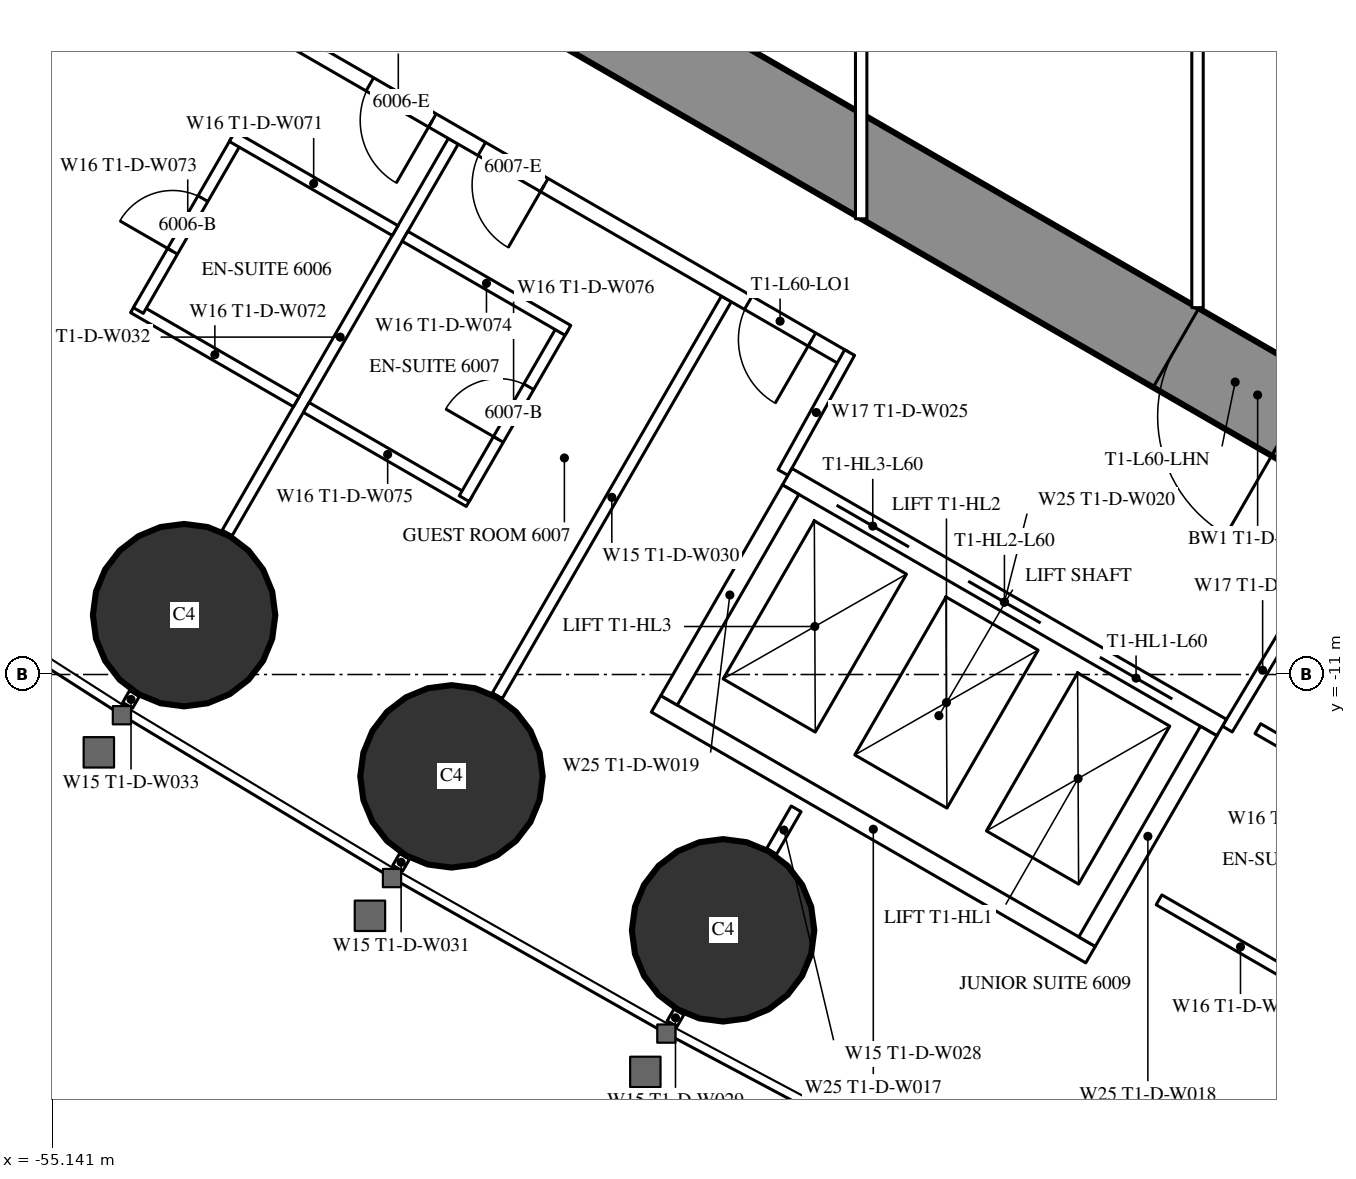
"""IFC4 building model, lengths in metres.
Left out: names, types, materials, properties, quantities, classifications, styles, units other than length and angle.
Written with IfcOpenShell. Run it as: python <this file> out.ifc"""

import sys

from ifc_helpers import new_model, si_unit, direction, frame, frame_2d, origin, origin_2d, place, context, subcontext, project, spatial, rectangle, circle, extrude, element, fill, save


model = new_model("IFC4")
c1 = context("Model", 3, precision=1e-05, world=origin(), true_north=direction((0.0, 1.0)))
c2 = subcontext(c1, "Body", "Model", "MODEL_VIEW")
j1 = project(units=[si_unit("LENGTHUNIT", "METRE"), si_unit("PLANEANGLEUNIT", "RADIAN")], contexts=[c1])
p1 = place(None, origin())
s1 = spatial("IfcSite", under=j1, at=p1, CompositionType="ELEMENT")
p2 = place(p1, origin())
s2 = spatial("IfcBuilding", under=s1, at=p2, CompositionType="ELEMENT")
p3 = place(p2, frame((0.0, 0.0, 226.1)))
s3 = spatial("IfcBuildingStorey", under=s2, at=p3, CompositionType="ELEMENT", Elevation=226.1)
for number, where, z_axis, x_axis in (
    (1, (-53.408, -10.219, 0.0), (0.0, 0.0, 1.0), (1.0, 0.0, 0.0)),
    (2, (-49.89, -12.34, 0.0), (0.0, 0.0, 1.0), (1.0, 0.0, 0.0)),
    (3, (-46.317, -14.365, 0.0), (0.0, 0.0, 1.0), (1.0, 0.0, 0.0)),
):
    element("IfcColumn", number, at=place(p3, frame(where, z_axis=z_axis, x_axis=x_axis)), inside=s3, PredefinedType="COLUMN", context=c2, shape_type="SweptSolid", body=[
        extrude(circle(Radius=1.2, at=origin_2d()), origin(), (0.0, 0.0, 1.0), 3.6),
    ])
p4 = place(p3, frame((-27.2, -14.3, 0.0), z_axis=(0.0, 0.0, 1.0), x_axis=(-0.866024021859, 0.500002393557, 0.0)))
e4 = element("IfcWall", 4, at=p4, inside=s3, PredefinedType="SHEAR", context=c2, shape_type="SweptSolid", body=[
    extrude(rectangle(XDim=27.907, YDim=1.2, at=frame_2d((13.954, 0.0))), origin(), (0.0, 0.0, 1.0), 3.6),
])
p5 = place(p4, frame((4.6, 0.0, 0.0)))
e5 = element("IfcOpeningElement", 5, at=p5, cuts=e4, PredefinedType="OPENING", context=c2, shape_type="SweptSolid", body=[
    extrude(rectangle(XDim=1.0, YDim=2.2, at=frame_2d((0.5, 1.1))), frame((0.0, 0.61, 0.0), z_axis=(0.0, -1.0, 0.0), x_axis=(1.0, 0.0, 0.0)), (0.0, 0.0, 1.0), 1.22),
])
p6 = place(p4, frame((13.395, 0.0, 0.0)))
e6 = element("IfcOpeningElement", 6, at=p6, cuts=e4, PredefinedType="OPENING", context=c2, shape_type="SweptSolid", body=[
    extrude(rectangle(XDim=1.8, YDim=2.2, at=frame_2d((0.9, 1.1))), frame((0.0, 0.61, 0.0), z_axis=(0.0, -1.0, 0.0), x_axis=(1.0, 0.0, 0.0)), (0.0, 0.0, 1.0), 1.22),
])
p7 = place(p3, frame((-46.898, -15.439, 0.0), z_axis=(0.0, 0.0, 1.0), x_axis=(-0.500232303069, -0.865891241997, 0.0)))
e7 = element("IfcWall", 7, at=p7, inside=s3, PredefinedType="PARTITIONING", context=c2, shape_type="SweptSolid", body=[
    extrude(rectangle(XDim=0.18, YDim=0.15, at=frame_2d((0.09, 0.0))), origin(), (0.0, 0.0, 1.0), 2.45),
])
p8 = place(p3, frame((-46.274, -6.059, 0.0), z_axis=(0.0, 0.0, 1.0), x_axis=(-0.500020471368, -0.866013584312, 0.0)))
e8 = element("IfcWall", 8, at=p8, inside=s3, PredefinedType="PARTITIONING", context=c2, shape_type="SweptSolid", body=[
    extrude(rectangle(XDim=6.028, YDim=0.15, at=frame_2d((3.014, 0.0))), origin(), (0.0, 0.0, 1.0), 2.45),
])
p9 = place(p3, frame((-50.508, -13.392, 0.0), z_axis=(0.0, 0.0, 1.0), x_axis=(-0.499644091975, -0.866230789891, 0.0)))
e9 = element("IfcWall", 9, at=p9, inside=s3, PredefinedType="PARTITIONING", context=c2, shape_type="SweptSolid", body=[
    extrude(rectangle(XDim=0.18, YDim=0.15, at=frame_2d((0.09, 0.0))), origin(), (0.0, 0.0, 1.0), 2.45),
])
p10 = place(p3, frame((-49.866, -3.985, 0.0), z_axis=(0.0, 0.0, 1.0), x_axis=(-0.500000694566, -0.866025002776, 0.0)))
e10 = element("IfcWall", 10, at=p10, inside=s3, PredefinedType="PARTITIONING", context=c2, shape_type="SweptSolid", body=[
    extrude(rectangle(XDim=5.95, YDim=0.15, at=frame_2d((2.975, 0.0))), origin(), (0.0, 0.0, 1.0), 2.45),
])
p11 = place(p3, frame((-54.061, -11.25, 0.0), z_axis=(0.0, 0.0, 1.0), x_axis=(-0.500391173478, -0.865799441849, 0.0)))
e11 = element("IfcWall", 11, at=p11, inside=s3, PredefinedType="PARTITIONING", context=c2, shape_type="SweptSolid", body=[
    extrude(rectangle(XDim=0.179, YDim=0.15, at=frame_2d((0.089, 0.0))), origin(), (0.0, 0.0, 1.0), 2.45),
])
p12 = place(p3, frame((-45.356, -12.767, 0.0), z_axis=(0.0, 0.0, 1.0), x_axis=(-0.499886366516, -0.866091000168, 0.0)))
e12 = element("IfcWall", 12, at=p12, inside=s3, PredefinedType="PARTITIONING", context=c2, shape_type="SweptSolid", body=[
    extrude(rectangle(XDim=0.645, YDim=0.15, at=frame_2d((0.322, 0.0))), origin(), (0.0, 0.0, 1.0), 3.35),
])
p13 = place(p3, frame((-44.715, -6.844, 0.0), z_axis=(0.0, 0.0, 1.0), x_axis=(-0.866025261224, 0.500000246922, 0.0)))
e13 = element("IfcWall", 13, at=p13, inside=s3, PredefinedType="PARTITIONING", context=c2, shape_type="SweptSolid", body=[
    extrude(rectangle(XDim=13.567, YDim=0.2, at=frame_2d((6.783, 0.0))), origin(), (0.0, 0.0, 1.0), 3.35),
])
p14 = place(p13, frame((6.266, 0.0, 0.0)))
e14 = element("IfcOpeningElement", 14, at=p14, cuts=e13, PredefinedType="OPENING", context=c2, shape_type="SweptSolid", body=[
    extrude(rectangle(XDim=0.95, YDim=2.2, at=frame_2d((0.475, 1.1))), frame((0.0, 0.11, 0.0), z_axis=(0.0, -1.0, 0.0), x_axis=(1.0, 0.0, 0.0)), (0.0, 0.0, 1.0), 0.22),
])
p15 = place(p13, frame((4.565, 0.0, 0.0)))
e15 = element("IfcOpeningElement", 15, at=p15, cuts=e13, PredefinedType="OPENING", context=c2, shape_type="SweptSolid", body=[
    extrude(rectangle(XDim=0.95, YDim=2.2, at=frame_2d((0.475, 1.1))), frame((0.0, 0.11, 0.0), z_axis=(0.0, -1.0, 0.0), x_axis=(1.0, 0.0, 0.0)), (0.0, 0.0, 1.0), 0.22),
])
p16 = place(p13, frame((0.5, 0.0, 0.0)))
e16 = element("IfcOpeningElement", 16, at=p16, cuts=e13, PredefinedType="OPENING", context=c2, shape_type="SweptSolid", body=[
    extrude(rectangle(XDim=0.967, YDim=2.2, at=frame_2d((0.483, 1.1))), frame((0.0, 0.11, 0.0), z_axis=(0.0, -1.0, 0.0), x_axis=(1.0, 0.0, 0.0)), (0.0, 0.0, 1.0), 0.22),
])
for number, where, z_axis, x_axis in (
    (17, (-39.683, -11.718, 0.0), (0.0, 0.0, 1.0), (0.514, 0.858, 0.0)),
    (18, (-44.652, -6.764, 0.0), (0.0, 0.0, 1.0), (-0.485, -0.874, 0.0)),
):
    element("IfcWall", number, at=place(p3, frame(where, z_axis=z_axis, x_axis=x_axis)), inside=s3, PredefinedType="PARTITIONING", context=c2, shape_type="SweptSolid", body=[
        extrude(rectangle(XDim=1.805, YDim=0.15, at=frame_2d((0.903, 0.0))), origin(), (0.0, 0.0, 1.0), 3.35),
    ])
p17 = place(p3, frame((-51.931, -7.411, 0.0), z_axis=(0.0, 0.0, 1.0), x_axis=(-0.866006523861, 0.500032699561, 0.0)))
e19 = element("IfcWall", 19, at=p17, inside=s3, PredefinedType="PARTITIONING", context=c2, shape_type="SweptSolid", body=[
    extrude(rectangle(XDim=2.475, YDim=0.15, at=frame_2d((1.237, 0.0))), origin(), (0.0, 0.0, 1.0), 3.35),
])
p18 = place(p3, frame((-52.71, -3.96, 0.0), z_axis=(0.0, 0.0, 1.0), x_axis=(-0.500006934395, -0.866021400173, 0.0)))
e20 = element("IfcWall", 20, at=p18, inside=s3, PredefinedType="PARTITIONING", context=c2, shape_type="SweptSolid", body=[
    extrude(rectangle(XDim=2.6, YDim=0.15, at=frame_2d((1.3, 0.0))), origin(), (0.0, 0.0, 1.0), 3.35),
])
p19 = place(p18, frame((0.9, 0.0, 0.0)))
e21 = element("IfcOpeningElement", 21, at=p19, cuts=e20, PredefinedType="OPENING", context=c2, shape_type="SweptSolid", body=[
    extrude(rectangle(XDim=0.8, YDim=2.2, at=frame_2d((0.4, 1.1))), frame((0.0, 0.085, 0.0), z_axis=(0.0, -1.0, 0.0), x_axis=(1.0, 0.0, 0.0)), (0.0, 0.0, 1.0), 0.17),
])
p20 = place(p3, frame((-50.631, -5.16, 0.0), z_axis=(0.0, 0.0, 1.0), x_axis=(-0.86604923931, 0.499958713387, 0.0)))
e22 = element("IfcWall", 22, at=p20, inside=s3, PredefinedType="PARTITIONING", context=c2, shape_type="SweptSolid", body=[
    extrude(rectangle(XDim=2.475, YDim=0.15, at=frame_2d((1.237, 0.0))), origin(), (0.0, 0.0, 1.0), 2.5),
])
p21 = place(p3, frame((-49.658, -8.724, 0.0), z_axis=(0.0, 0.0, 1.0), x_axis=(-0.866031185235, 0.4999899861, 0.0)))
e23 = element("IfcWall", 23, at=p21, inside=s3, PredefinedType="PARTITIONING", context=c2, shape_type="SweptSolid", body=[
    extrude(rectangle(XDim=2.475, YDim=0.15, at=frame_2d((1.238, 0.0))), origin(), (0.0, 0.0, 1.0), 3.35),
])
p22 = place(p3, frame((-48.423, -6.435, 0.0), z_axis=(0.0, 0.0, 1.0), x_axis=(-0.500006934395, -0.866021400173, 0.0)))
e24 = element("IfcWall", 24, at=p22, inside=s3, PredefinedType="PARTITIONING", context=c2, shape_type="SweptSolid", body=[
    extrude(rectangle(XDim=2.6, YDim=0.15, at=frame_2d((1.3, 0.0))), origin(), (0.0, 0.0, 1.0), 3.35),
])
p23 = place(p22, frame((0.9, 0.0, 0.0)))
e25 = element("IfcOpeningElement", 25, at=p23, cuts=e24, PredefinedType="OPENING", context=c2, shape_type="SweptSolid", body=[
    extrude(rectangle(XDim=0.8, YDim=2.2, at=frame_2d((0.4, 1.1))), frame((0.0, 0.085, 0.0), z_axis=(0.0, -1.0, 0.0), x_axis=(1.0, 0.0, 0.0)), (0.0, 0.0, 1.0), 0.17),
])
p24 = place(p3, frame((-48.358, -6.472, 0.0), z_axis=(0.0, 0.0, 1.0), x_axis=(-0.866073894602, 0.499916002032, 0.0)))
e26 = element("IfcWall", 26, at=p24, inside=s3, PredefinedType="PARTITIONING", context=c2, shape_type="SweptSolid", body=[
    extrude(rectangle(XDim=2.475, YDim=0.15, at=frame_2d((1.238, 0.0))), origin(), (0.0, 0.0, 1.0), 2.5),
])
p25 = place(p3, frame((-38.438, -15.202, 0.0), z_axis=(0.0, 0.0, 1.0), x_axis=(-0.866073894602, 0.499916002032, 0.0)))
e27 = element("IfcWall", 27, at=p25, inside=s3, PredefinedType="PARTITIONING", context=c2, shape_type="SweptSolid", body=[
    extrude(rectangle(XDim=2.475, YDim=0.15, at=frame_2d((1.238, 0.0))), origin(), (0.0, 0.0, 1.0), 3.35),
])
p26 = place(p3, frame((-37.138, -12.95, 0.0), z_axis=(0.0, 0.0, 1.0), x_axis=(-0.866031185235, 0.4999899861, 0.0)))
e28 = element("IfcWall", 28, at=p26, inside=s3, PredefinedType="PARTITIONING", context=c2, shape_type="SweptSolid", body=[
    extrude(rectangle(XDim=2.475, YDim=0.15, at=frame_2d((1.238, 0.0))), origin(), (0.0, 0.0, 1.0), 2.5),
])
p27 = place(p3, frame((-40.075, 6.174, 0.0), z_axis=(0.0, 0.0, 1.0), x_axis=(0.0, -1.0, 0.0)))
e29 = element("IfcWall", 29, at=p27, inside=s3, PredefinedType="PARTITIONING", context=c2, shape_type="SweptSolid", body=[
    extrude(rectangle(XDim=12.348, YDim=0.15, at=frame_2d((6.174, 0.0))), origin(), (0.0, 0.0, 1.0), 3.35),
])
p28 = place(p27, frame((5.274, 0.0, 0.0)))
e30 = element("IfcOpeningElement", 30, at=p28, cuts=e29, PredefinedType="OPENING", context=c2, shape_type="SweptSolid", body=[
    extrude(rectangle(XDim=1.8, YDim=2.2, at=frame_2d((0.9, 1.1))), frame((0.0, 0.085, 0.0), z_axis=(0.0, -1.0, 0.0), x_axis=(1.0, 0.0, 0.0)), (0.0, 0.0, 1.0), 0.17),
])
p29 = place(p3, frame((-44.5, 5.005, 0.0), z_axis=(0.0, 0.0, 1.0), x_axis=(0.0, -1.0, 0.0)))
e31 = element("IfcWall", 31, at=p29, inside=s3, PredefinedType="PARTITIONING", context=c2, shape_type="SweptSolid", body=[
    extrude(rectangle(XDim=10.009, YDim=0.15, at=frame_2d((5.005, 0.0))), origin(), (0.0, 0.0, 1.0), 2.5),
])
p30 = place(p29, frame((4.505, 0.0, 0.0)))
e32 = element("IfcOpeningElement", 32, at=p30, cuts=e31, PredefinedType="OPENING", context=c2, shape_type="SweptSolid", body=[
    extrude(rectangle(XDim=1.0, YDim=2.2, at=frame_2d((0.5, 1.1))), frame((0.0, 0.085, 0.0), z_axis=(0.0, -1.0, 0.0), x_axis=(1.0, 0.0, 0.0)), (0.0, 0.0, 1.0), 0.17),
])
p31 = place(p3, frame((-39.758, -11.697, 0.0), z_axis=(0.0, 0.0, 1.0), x_axis=(-0.866024194504, 0.500002094529, 0.0)))
e33 = element("IfcWall", 33, at=p31, inside=s3, PredefinedType="PARTITIONING", context=c2, shape_type="SweptSolid", body=[
    extrude(rectangle(XDim=6.6, YDim=0.25, at=frame_2d((3.3, 0.0))), origin(), (0.0, 0.0, 1.0), 3.35),
])
p32 = place(p31, frame((0.75, 0.0, 0.0)))
e34 = element("IfcOpeningElement", 34, at=p32, cuts=e33, PredefinedType="OPENING", context=c2, shape_type="SweptSolid", body=[
    extrude(rectangle(XDim=1.1, YDim=2.2, at=frame_2d((0.55, 1.1))), frame((0.0, 0.135, 0.0), z_axis=(0.0, -1.0, 0.0), x_axis=(1.0, 0.0, 0.0)), (0.0, 0.0, 1.0), 0.27),
])
p33 = place(p31, frame((2.75, 0.0, 0.0)))
e35 = element("IfcOpeningElement", 35, at=p33, cuts=e33, PredefinedType="OPENING", context=c2, shape_type="SweptSolid", body=[
    extrude(rectangle(XDim=1.1, YDim=2.2, at=frame_2d((0.55, 1.1))), frame((0.0, 0.135, 0.0), z_axis=(0.0, -1.0, 0.0), x_axis=(1.0, 0.0, 0.0)), (0.0, 0.0, 1.0), 0.27),
])
p34 = place(p31, frame((4.75, 0.0, 0.0)))
e36 = element("IfcOpeningElement", 36, at=p34, cuts=e33, PredefinedType="OPENING", context=c2, shape_type="SweptSolid", body=[
    extrude(rectangle(XDim=1.1, YDim=2.2, at=frame_2d((0.55, 1.1))), frame((0.0, 0.135, 0.0), z_axis=(0.0, -1.0, 0.0), x_axis=(1.0, 0.0, 0.0)), (0.0, 0.0, 1.0), 0.27),
])
p35 = place(p3, frame((-41.482, -14.686, 0.0), z_axis=(0.0, 0.0, 1.0), x_axis=(-0.86603344179, 0.499986077507, 0.0)))
e37 = element("IfcWall", 37, at=p35, inside=s3, PredefinedType="PARTITIONING", context=c2, shape_type="SweptSolid", body=[
    extrude(rectangle(XDim=6.6, YDim=0.25, at=frame_2d((3.3, 0.0))), origin(), (0.0, 0.0, 1.0), 3.35),
])
for number, where, z_axis, x_axis in (
    (38, (-39.928, -11.743, 0.0), (0.0, 0.0, 1.0), (-0.5, -0.866, 0.0)),
    (39, (-45.428, -8.568, 0.0), (0.0, 0.0, 1.0), (-0.5, -0.866, 0.0)),
):
    element("IfcWall", number, at=place(p3, frame(where, z_axis=z_axis, x_axis=x_axis)), inside=s3, PredefinedType="PARTITIONING", context=c2, shape_type="SweptSolid", body=[
        extrude(rectangle(XDim=3.201, YDim=0.25, at=frame_2d((1.6, 0.0))), origin(), (0.0, 0.0, 1.0), 3.35),
    ])
p36 = place(p19, origin())
e40 = element("IfcDoor", 40, at=p36, inside=s3, OperationType="SINGLE_SWING_RIGHT", PredefinedType="DOOR", context=c2, shape_type="SweptSolid", body=[
    extrude(rectangle(XDim=0.8, YDim=2.2, at=frame_2d((0.4, 1.1))), frame((0.0, 0.025, 0.0), z_axis=(0.0, -1.0, 0.0), x_axis=(1.0, 0.0, 0.0)), (0.0, 0.0, 1.0), 0.05),
])
fill(e21, e40)
p37 = place(p14, origin())
e41 = element("IfcDoor", 41, at=p37, inside=s3, OperationType="SINGLE_SWING_LEFT", PredefinedType="DOOR", context=c2, shape_type="SweptSolid", body=[
    extrude(rectangle(XDim=0.95, YDim=2.2, at=frame_2d((0.475, 1.1))), frame((0.0, 0.025, 0.0), z_axis=(0.0, -1.0, 0.0), x_axis=(1.0, 0.0, 0.0)), (0.0, 0.0, 1.0), 0.05),
])
fill(e14, e41)
p38 = place(p23, origin())
e42 = element("IfcDoor", 42, at=p38, inside=s3, OperationType="SINGLE_SWING_RIGHT", PredefinedType="DOOR", context=c2, shape_type="SweptSolid", body=[
    extrude(rectangle(XDim=0.8, YDim=2.2, at=frame_2d((0.4, 1.1))), frame((0.0, 0.025, 0.0), z_axis=(0.0, -1.0, 0.0), x_axis=(1.0, 0.0, 0.0)), (0.0, 0.0, 1.0), 0.05),
])
fill(e25, e42)
p39 = place(p15, origin())
e43 = element("IfcDoor", 43, at=p39, inside=s3, OperationType="SINGLE_SWING_LEFT", PredefinedType="DOOR", context=c2, shape_type="SweptSolid", body=[
    extrude(rectangle(XDim=0.95, YDim=2.2, at=frame_2d((0.475, 1.1))), frame((0.0, 0.025, 0.0), z_axis=(0.0, -1.0, 0.0), x_axis=(1.0, 0.0, 0.0)), (0.0, 0.0, 1.0), 0.05),
])
fill(e15, e43)
p40 = place(p16, origin())
e44 = element("IfcDoor", 44, at=p40, inside=s3, OperationType="SINGLE_SWING_LEFT", PredefinedType="DOOR", context=c2, shape_type="SweptSolid", body=[
    extrude(rectangle(XDim=0.967, YDim=2.2, at=frame_2d((0.483, 1.1))), frame((0.0, 0.025, 0.0), z_axis=(0.0, -1.0, 0.0), x_axis=(1.0, 0.0, 0.0)), (0.0, 0.0, 1.0), 0.05),
])
fill(e16, e44)
p41 = place(p6, origin())
e45 = element("IfcDoor", 45, at=p41, inside=s3, OperationType="DOUBLE_DOOR_SINGLE_SWING", PredefinedType="DOOR", context=c2, shape_type="SweptSolid", body=[
    extrude(rectangle(XDim=1.8, YDim=2.2, at=frame_2d((0.9, 1.1))), frame((0.0, 0.025, 0.0), z_axis=(0.0, -1.0, 0.0), x_axis=(1.0, 0.0, 0.0)), (0.0, 0.0, 1.0), 0.05),
])
fill(e6, e45)
p42 = place(p32, origin())
e46 = element("IfcDoor", 46, at=p42, inside=s3, OperationType="DOUBLE_DOOR_SLIDING", PredefinedType="USERDEFINED", context=c2, shape_type="SweptSolid", body=[
    extrude(rectangle(XDim=1.1, YDim=2.2, at=frame_2d((0.55, 1.1))), frame((0.0, 0.025, 0.0), z_axis=(0.0, -1.0, 0.0), x_axis=(1.0, 0.0, 0.0)), (0.0, 0.0, 1.0), 0.05),
])
fill(e34, e46)
p43 = place(p33, origin())
e47 = element("IfcDoor", 47, at=p43, inside=s3, OperationType="DOUBLE_DOOR_SLIDING", PredefinedType="USERDEFINED", context=c2, shape_type="SweptSolid", body=[
    extrude(rectangle(XDim=1.1, YDim=2.2, at=frame_2d((0.55, 1.1))), frame((0.0, 0.025, 0.0), z_axis=(0.0, -1.0, 0.0), x_axis=(1.0, 0.0, 0.0)), (0.0, 0.0, 1.0), 0.05),
])
fill(e35, e47)
p44 = place(p34, origin())
e48 = element("IfcDoor", 48, at=p44, inside=s3, OperationType="DOUBLE_DOOR_SLIDING", PredefinedType="USERDEFINED", context=c2, shape_type="SweptSolid", body=[
    extrude(rectangle(XDim=1.1, YDim=2.2, at=frame_2d((0.55, 1.1))), frame((0.0, 0.025, 0.0), z_axis=(0.0, -1.0, 0.0), x_axis=(1.0, 0.0, 0.0)), (0.0, 0.0, 1.0), 0.05),
])
fill(e36, e48)
save(model, sys.argv[1])
